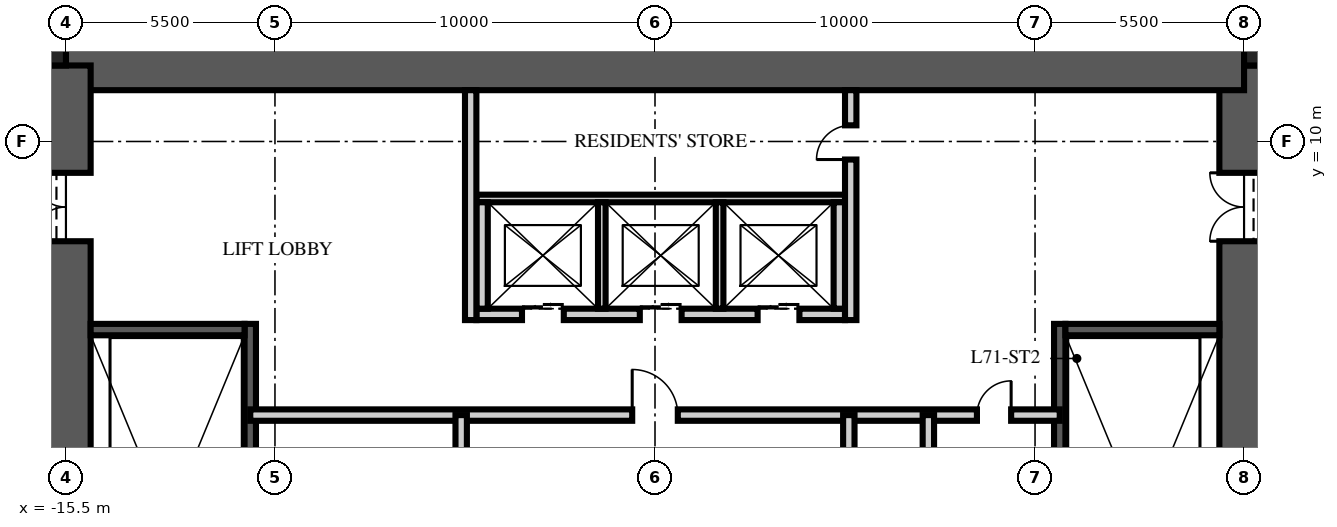
"""IFC4 building model, lengths in metres.
Left out: names, types, materials, properties, quantities, classifications, styles, units other than length and angle.
Written with IfcOpenShell. Run it as: python <this file> out.ifc"""

import sys

from ifc_helpers import new_model, si_unit, direction, frame, frame_2d, origin, origin_2d, place, context, subcontext, project, spatial, rectangle, extrude, element, fill, save


model = new_model("IFC4")
c1 = context("Model", 3, precision=1e-05, world=origin(), true_north=direction((0.0, 1.0)))
c2 = subcontext(c1, "Body", "Model", "MODEL_VIEW")
j1 = project(units=[si_unit("LENGTHUNIT", "METRE"), si_unit("PLANEANGLEUNIT", "RADIAN")], contexts=[c1])
p1 = place(None, origin())
s1 = spatial("IfcSite", under=j1, at=p1, CompositionType="ELEMENT")
p2 = place(p1, origin())
s2 = spatial("IfcBuilding", under=s1, at=p2, CompositionType="ELEMENT")
p3 = place(p2, frame((0.0, 0.0, 285.75)))
s3 = spatial("IfcBuildingStorey", under=s2, at=p3, CompositionType="ELEMENT", Elevation=285.75)
p4 = place(p3, frame((15.5, -12.0, -0.25), z_axis=(0.0, 0.0, 1.0), x_axis=(0.0, 1.0, 0.0)))
e1 = element("IfcWall", 1, at=p4, inside=s3, PredefinedType="SHEAR", context=c2, shape_type="SweptSolid", body=[
    extrude(rectangle(XDim=24.0, YDim=1.3, at=frame_2d((12.0, 0.0))), origin(), (0.0, 0.0, 1.0), 3.75),
])
p5 = place(p4, frame((3.125, 0.0, 0.25)))
e2 = element("IfcOpeningElement", 2, at=p5, cuts=e1, PredefinedType="OPENING", context=c2, shape_type="SweptSolid", body=[
    extrude(rectangle(XDim=1.2, YDim=2.1, at=frame_2d((0.6, 1.05))), frame((0.0, 0.66, 0.0), z_axis=(0.0, -1.0, 0.0), x_axis=(1.0, 0.0, 0.0)), (0.0, 0.0, 1.0), 1.32),
])
p6 = place(p4, frame((19.375, 0.0, 0.25)))
e3 = element("IfcOpeningElement", 3, at=p6, cuts=e1, PredefinedType="OPENING", context=c2, shape_type="SweptSolid", body=[
    extrude(rectangle(XDim=1.8, YDim=2.1, at=frame_2d((0.9, 1.05))), frame((0.0, 0.66, 0.0), z_axis=(0.0, -1.0, 0.0), x_axis=(1.0, 0.0, 0.0)), (0.0, 0.0, 1.0), 1.32),
])
p7 = place(p3, frame((-15.5, 12.0, -0.25), z_axis=(0.0, 0.0, 1.0), x_axis=(1.0, 0.0, 0.0)))
e4 = element("IfcWall", 4, at=p7, inside=s3, PredefinedType="SHEAR", context=c2, shape_type="SweptSolid", body=[
    extrude(rectangle(XDim=31.0, YDim=1.3, at=frame_2d((15.5, 0.0))), origin(), (0.0, 0.0, 1.0), 3.75),
])
p8 = place(p3, frame((-15.5, -12.0, -0.25), z_axis=(0.0, 0.0, 1.0), x_axis=(0.0, 1.0, 0.0)))
e5 = element("IfcWall", 5, at=p8, inside=s3, PredefinedType="SHEAR", context=c2, shape_type="SweptSolid", body=[
    extrude(rectangle(XDim=24.0, YDim=1.3, at=frame_2d((12.0, 0.0))), origin(), (0.0, 0.0, 1.0), 3.75),
])
p9 = place(p8, frame((3.125, 0.0, 0.25)))
e6 = element("IfcOpeningElement", 6, at=p9, cuts=e5, PredefinedType="OPENING", context=c2, shape_type="SweptSolid", body=[
    extrude(rectangle(XDim=1.2, YDim=2.1, at=frame_2d((0.6, 1.05))), frame((0.0, 0.66, 0.0), z_axis=(0.0, -1.0, 0.0), x_axis=(1.0, 0.0, 0.0)), (0.0, 0.0, 1.0), 1.32),
])
p10 = place(p8, frame((19.375, 0.0, 0.25)))
e7 = element("IfcOpeningElement", 7, at=p10, cuts=e5, PredefinedType="OPENING", context=c2, shape_type="SweptSolid", body=[
    extrude(rectangle(XDim=1.8, YDim=2.1, at=frame_2d((0.9, 1.05))), frame((0.0, 0.66, 0.0), z_axis=(0.0, -1.0, 0.0), x_axis=(1.0, 0.0, 0.0)), (0.0, 0.0, 1.0), 1.32),
])
for number, where, z_axis, x_axis in (
    (8, (15.825, 12.325, -0.25), (0.0, 0.0, 1.0), (1.0, 0.0, 0.0)),
    (9, (-15.825, 12.325, -0.25), (0.0, 0.0, 1.0), (1.0, 0.0, 0.0)),
):
    element("IfcColumn", number, at=place(p3, frame(where, z_axis=z_axis, x_axis=x_axis)), inside=s3, PredefinedType="COLUMN", context=c2, shape_type="SweptSolid", body=[
        extrude(rectangle(XDim=0.65, YDim=0.65, at=origin_2d()), origin(), (0.0, 0.0, 1.0), 3.75),
    ])
p11 = place(p3, frame((-10.65, -4.9, 0.0), z_axis=(0.0, 0.0, 1.0), x_axis=(0.0, 1.0, 0.0)))
e10 = element("IfcWall", 10, at=p11, inside=s3, PredefinedType="SOLIDWALL", context=c2, shape_type="SweptSolid", body=[
    extrude(rectangle(XDim=10.1, YDim=0.3, at=frame_2d((5.05, 0.0))), origin(), (0.0, 0.0, 1.0), 3.5),
])
p12 = place(p3, frame((-14.85, 5.05, 0.0), z_axis=(0.0, 0.0, 1.0), x_axis=(1.0, 0.0, 0.0)))
e11 = element("IfcWall", 11, at=p12, inside=s3, PredefinedType="SOLIDWALL", context=c2, shape_type="SweptSolid", body=[
    extrude(rectangle(XDim=4.05, YDim=0.3, at=frame_2d((2.025, 0.0))), origin(), (0.0, 0.0, 1.0), 3.5),
])
p13 = place(p3, frame((10.65, -4.9, 0.0), z_axis=(0.0, 0.0, 1.0), x_axis=(0.0, 1.0, 0.0)))
e12 = element("IfcWall", 12, at=p13, inside=s3, PredefinedType="SOLIDWALL", context=c2, shape_type="SweptSolid", body=[
    extrude(rectangle(XDim=10.1, YDim=0.3, at=frame_2d((5.05, 0.0))), origin(), (0.0, 0.0, 1.0), 3.5),
])
p14 = place(p3, frame((14.85, 5.05, 0.0), z_axis=(0.0, 0.0, 1.0), x_axis=(-1.0, 0.0, 0.0)))
e13 = element("IfcWall", 13, at=p14, inside=s3, PredefinedType="SOLIDWALL", context=c2, shape_type="SweptSolid", body=[
    extrude(rectangle(XDim=4.05, YDim=0.3, at=frame_2d((2.025, 0.0))), origin(), (0.0, 0.0, 1.0), 3.5),
])
p15 = place(p3, frame((-4.7, 5.45, 0.0), z_axis=(0.0, 0.0, 1.0), x_axis=(1.0, 0.0, 0.0)))
e14 = element("IfcWall", 14, at=p15, inside=s3, PredefinedType="PARTITIONING", context=c2, shape_type="SweptSolid", body=[
    extrude(rectangle(XDim=9.7, YDim=0.3, at=frame_2d((4.85, 0.0))), origin(), (0.0, 0.0, 1.0), 3.5),
])
p16 = place(p15, frame((1.2, 0.0, 0.0)))
e15 = element("IfcOpeningElement", 15, at=p16, cuts=e14, PredefinedType="OPENING", context=c2, shape_type="SweptSolid", body=[
    extrude(rectangle(XDim=1.1, YDim=2.1, at=frame_2d((0.55, 1.05))), frame((0.0, 0.16, 0.0), z_axis=(0.0, -1.0, 0.0), x_axis=(1.0, 0.0, 0.0)), (0.0, 0.0, 1.0), 0.32),
])
p17 = place(p15, frame((4.3, 0.0, 0.0)))
e16 = element("IfcOpeningElement", 16, at=p17, cuts=e14, PredefinedType="OPENING", context=c2, shape_type="SweptSolid", body=[
    extrude(rectangle(XDim=1.1, YDim=2.1, at=frame_2d((0.55, 1.05))), frame((0.0, 0.16, 0.0), z_axis=(0.0, -1.0, 0.0), x_axis=(1.0, 0.0, 0.0)), (0.0, 0.0, 1.0), 0.32),
])
p18 = place(p15, frame((7.4, 0.0, 0.0)))
e17 = element("IfcOpeningElement", 17, at=p18, cuts=e14, PredefinedType="OPENING", context=c2, shape_type="SweptSolid", body=[
    extrude(rectangle(XDim=1.1, YDim=2.1, at=frame_2d((0.55, 1.05))), frame((0.0, 0.16, 0.0), z_axis=(0.0, -1.0, 0.0), x_axis=(1.0, 0.0, 0.0)), (0.0, 0.0, 1.0), 0.32),
])
p19 = place(p3, frame((-4.7, 8.5, 0.0), z_axis=(0.0, 0.0, 1.0), x_axis=(1.0, 0.0, 0.0)))
e18 = element("IfcWall", 18, at=p19, inside=s3, PredefinedType="PARTITIONING", context=c2, shape_type="SweptSolid", body=[
    extrude(rectangle(XDim=9.7, YDim=0.2, at=frame_2d((4.85, 0.0))), origin(), (0.0, 0.0, 1.0), 3.5),
])
for number, where, z_axis, x_axis in (
    (19, (-4.55, 5.6, 0.0), (0.0, 0.0, 1.0), (0.0, 1.0, 0.0)),
    (20, (4.85, 5.6, 0.0), (0.0, 0.0, 1.0), (0.0, 1.0, 0.0)),
):
    element("IfcWall", number, at=place(p3, frame(where, z_axis=z_axis, x_axis=x_axis)), inside=s3, PredefinedType="PARTITIONING", context=c2, shape_type="SweptSolid", body=[
        extrude(rectangle(XDim=2.8, YDim=0.3, at=frame_2d((1.4, 0.0))), origin(), (0.0, 0.0, 1.0), 3.5),
    ])
for number, where, z_axis, x_axis in (
    (21, (-1.4, 5.6, 0.0), (0.0, 0.0, 1.0), (0.0, 1.0, 0.0)),
    (22, (1.7, 5.6, 0.0), (0.0, 0.0, 1.0), (0.0, 1.0, 0.0)),
):
    element("IfcWall", number, at=place(p3, frame(where, z_axis=z_axis, x_axis=x_axis)), inside=s3, PredefinedType="PARTITIONING", context=c2, shape_type="SweptSolid", body=[
        extrude(rectangle(XDim=2.8, YDim=0.2, at=frame_2d((1.4, 0.0))), origin(), (0.0, 0.0, 1.0), 3.5),
    ])
p20 = place(p3, frame((-10.65, 2.8, 0.0), z_axis=(0.0, 0.0, 1.0), x_axis=(1.0, 0.0, 0.0)))
e23 = element("IfcWall", 23, at=p20, inside=s3, PredefinedType="PARTITIONING", context=c2, shape_type="SweptSolid", body=[
    extrude(rectangle(XDim=21.3, YDim=0.3, at=frame_2d((10.65, 0.0))), origin(), (0.0, 0.0, 1.0), 3.5),
])
p21 = place(p20, frame((10.05, 0.0, 0.0)))
e24 = element("IfcOpeningElement", 24, at=p21, cuts=e23, PredefinedType="OPENING", context=c2, shape_type="SweptSolid", body=[
    extrude(rectangle(XDim=1.2, YDim=2.1, at=frame_2d((0.6, 1.05))), frame((0.0, 0.16, 0.0), z_axis=(0.0, -1.0, 0.0), x_axis=(1.0, 0.0, 0.0)), (0.0, 0.0, 1.0), 0.32),
])
p22 = place(p20, frame((19.121, 0.0, 0.0)))
e25 = element("IfcOpeningElement", 25, at=p22, cuts=e23, PredefinedType="OPENING", context=c2, shape_type="SweptSolid", body=[
    extrude(rectangle(XDim=0.9, YDim=2.1, at=frame_2d((0.45, 1.05))), frame((0.0, 0.16, 0.0), z_axis=(0.0, -1.0, 0.0), x_axis=(1.0, 0.0, 0.0)), (0.0, 0.0, 1.0), 0.32),
])
p23 = place(p3, frame((-5.1, -6.65, 0.0), z_axis=(0.0, 0.0, 1.0), x_axis=(0.0, 1.0, 0.0)))
e26 = element("IfcWall", 26, at=p23, inside=s3, PredefinedType="PARTITIONING", context=c2, shape_type="SweptSolid", body=[
    extrude(rectangle(XDim=9.45, YDim=0.3, at=frame_2d((4.725, 0.0))), origin(), (0.0, 0.0, 1.0), 3.5),
])
p24 = place(p23, frame((2.648, 0.0, 0.0)))
e27 = element("IfcOpeningElement", 27, at=p24, cuts=e26, PredefinedType="OPENING", context=c2, shape_type="SweptSolid", body=[
    extrude(rectangle(XDim=0.9, YDim=2.1, at=frame_2d((0.45, 1.05))), frame((0.0, 0.16, 0.0), z_axis=(0.0, -1.0, 0.0), x_axis=(1.0, 0.0, 0.0)), (0.0, 0.0, 1.0), 0.32),
])
p25 = place(p23, frame((7.373, 0.0, 0.0)))
e28 = element("IfcOpeningElement", 28, at=p25, cuts=e26, PredefinedType="OPENING", context=c2, shape_type="SweptSolid", body=[
    extrude(rectangle(XDim=0.9, YDim=2.1, at=frame_2d((0.45, 1.05))), frame((0.0, 0.16, 0.0), z_axis=(0.0, -1.0, 0.0), x_axis=(1.0, 0.0, 0.0)), (0.0, 0.0, 1.0), 0.32),
])
p26 = place(p3, frame((5.1, -6.65, 0.0), z_axis=(0.0, 0.0, 1.0), x_axis=(0.0, 1.0, 0.0)))
e29 = element("IfcWall", 29, at=p26, inside=s3, PredefinedType="PARTITIONING", context=c2, shape_type="SweptSolid", body=[
    extrude(rectangle(XDim=9.45, YDim=0.3, at=frame_2d((4.725, 0.0))), origin(), (0.0, 0.0, 1.0), 3.5),
])
p27 = place(p26, frame((4.275, 0.0, 0.0)))
e30 = element("IfcOpeningElement", 30, at=p27, cuts=e29, PredefinedType="OPENING", context=c2, shape_type="SweptSolid", body=[
    extrude(rectangle(XDim=0.9, YDim=2.1, at=frame_2d((0.45, 1.05))), frame((0.0, 0.16, 0.0), z_axis=(0.0, -1.0, 0.0), x_axis=(1.0, 0.0, 0.0)), (0.0, 0.0, 1.0), 0.32),
])
p28 = place(p3, frame((7.193, -6.65, 0.0), z_axis=(0.0, 0.0, 1.0), x_axis=(0.0, 1.0, 0.0)))
e31 = element("IfcWall", 31, at=p28, inside=s3, PredefinedType="PARTITIONING", context=c2, shape_type="SweptSolid", body=[
    extrude(rectangle(XDim=9.45, YDim=0.3, at=frame_2d((4.725, 0.0))), origin(), (0.0, 0.0, 1.0), 3.5),
])
p29 = place(p3, frame((-4.85, 5.3, 0.0), z_axis=(0.0, 0.0, 1.0), x_axis=(0.0, 1.0, 0.0)))
e32 = element("IfcWall", 32, at=p29, inside=s3, PredefinedType="PARTITIONING", context=c2, shape_type="SweptSolid", body=[
    extrude(rectangle(XDim=6.05, YDim=0.3, at=frame_2d((3.025, 0.0))), origin(), (0.0, 0.0, 1.0), 3.5),
])
p30 = place(p3, frame((5.15, 5.3, 0.0), z_axis=(0.0, 0.0, 1.0), x_axis=(0.0, 1.0, 0.0)))
e33 = element("IfcWall", 33, at=p30, inside=s3, PredefinedType="PARTITIONING", context=c2, shape_type="SweptSolid", body=[
    extrude(rectangle(XDim=6.05, YDim=0.3, at=frame_2d((3.025, 0.0))), origin(), (0.0, 0.0, 1.0), 3.5),
])
p31 = place(p30, frame((4.225, 0.0, 0.0)))
e34 = element("IfcOpeningElement", 34, at=p31, cuts=e33, PredefinedType="OPENING", context=c2, shape_type="SweptSolid", body=[
    extrude(rectangle(XDim=0.9, YDim=2.1, at=frame_2d((0.45, 1.05))), frame((0.0, 0.16, 0.0), z_axis=(0.0, -1.0, 0.0), x_axis=(1.0, 0.0, 0.0)), (0.0, 0.0, 1.0), 0.32),
])
p32 = place(p10, origin())
e35 = element("IfcDoor", 35, at=p32, inside=s3, OperationType="DOUBLE_DOOR_SINGLE_SWING", PredefinedType="DOOR", context=c2, shape_type="SweptSolid", body=[
    extrude(rectangle(XDim=1.8, YDim=2.1, at=frame_2d((0.9, 1.05))), frame((0.0, 0.025, 0.0), z_axis=(0.0, -1.0, 0.0), x_axis=(1.0, 0.0, 0.0)), (0.0, 0.0, 1.0), 0.05),
])
fill(e7, e35)
p33 = place(p6, origin())
e36 = element("IfcDoor", 36, at=p33, inside=s3, OperationType="DOUBLE_DOOR_SINGLE_SWING", PredefinedType="DOOR", context=c2, shape_type="SweptSolid", body=[
    extrude(rectangle(XDim=1.8, YDim=2.1, at=frame_2d((0.9, 1.05))), frame((0.0, 0.025, 0.0), z_axis=(0.0, -1.0, 0.0), x_axis=(1.0, 0.0, 0.0)), (0.0, 0.0, 1.0), 0.05),
])
fill(e3, e36)
p34 = place(p16, origin())
e37 = element("IfcDoor", 37, at=p34, inside=s3, OperationType="DOUBLE_DOOR_SLIDING", PredefinedType="DOOR", context=c2, shape_type="SweptSolid", body=[
    extrude(rectangle(XDim=1.1, YDim=2.1, at=frame_2d((0.55, 1.05))), frame((0.0, 0.025, 0.0), z_axis=(0.0, -1.0, 0.0), x_axis=(1.0, 0.0, 0.0)), (0.0, 0.0, 1.0), 0.05),
])
fill(e15, e37)
p35 = place(p17, origin())
e38 = element("IfcDoor", 38, at=p35, inside=s3, OperationType="DOUBLE_DOOR_SLIDING", PredefinedType="DOOR", context=c2, shape_type="SweptSolid", body=[
    extrude(rectangle(XDim=1.1, YDim=2.1, at=frame_2d((0.55, 1.05))), frame((0.0, 0.025, 0.0), z_axis=(0.0, -1.0, 0.0), x_axis=(1.0, 0.0, 0.0)), (0.0, 0.0, 1.0), 0.05),
])
fill(e16, e38)
p36 = place(p18, origin())
e39 = element("IfcDoor", 39, at=p36, inside=s3, OperationType="DOUBLE_DOOR_SLIDING", PredefinedType="DOOR", context=c2, shape_type="SweptSolid", body=[
    extrude(rectangle(XDim=1.1, YDim=2.1, at=frame_2d((0.55, 1.05))), frame((0.0, 0.025, 0.0), z_axis=(0.0, -1.0, 0.0), x_axis=(1.0, 0.0, 0.0)), (0.0, 0.0, 1.0), 0.05),
])
fill(e17, e39)
p37 = place(p21, origin())
e40 = element("IfcDoor", 40, at=p37, inside=s3, OperationType="SINGLE_SWING_LEFT", PredefinedType="DOOR", context=c2, shape_type="SweptSolid", body=[
    extrude(rectangle(XDim=1.2, YDim=2.1, at=frame_2d((0.6, 1.05))), frame((0.0, 0.025, 0.0), z_axis=(0.0, -1.0, 0.0), x_axis=(1.0, 0.0, 0.0)), (0.0, 0.0, 1.0), 0.05),
])
fill(e24, e40)
p38 = place(p22, origin())
e41 = element("IfcDoor", 41, at=p38, inside=s3, OperationType="SINGLE_SWING_RIGHT", PredefinedType="DOOR", context=c2, shape_type="SweptSolid", body=[
    extrude(rectangle(XDim=0.9, YDim=2.1, at=frame_2d((0.45, 1.05))), frame((0.0, 0.025, 0.0), z_axis=(0.0, -1.0, 0.0), x_axis=(1.0, 0.0, 0.0)), (0.0, 0.0, 1.0), 0.05),
])
fill(e25, e41)
p39 = place(p31, origin())
e42 = element("IfcDoor", 42, at=p39, inside=s3, OperationType="SINGLE_SWING_LEFT", PredefinedType="DOOR", context=c2, shape_type="SweptSolid", body=[
    extrude(rectangle(XDim=0.9, YDim=2.1, at=frame_2d((0.45, 1.05))), frame((0.0, 0.025, 0.0), z_axis=(0.0, -1.0, 0.0), x_axis=(1.0, 0.0, 0.0)), (0.0, 0.0, 1.0), 0.05),
])
fill(e34, e42)
save(model, sys.argv[1])
